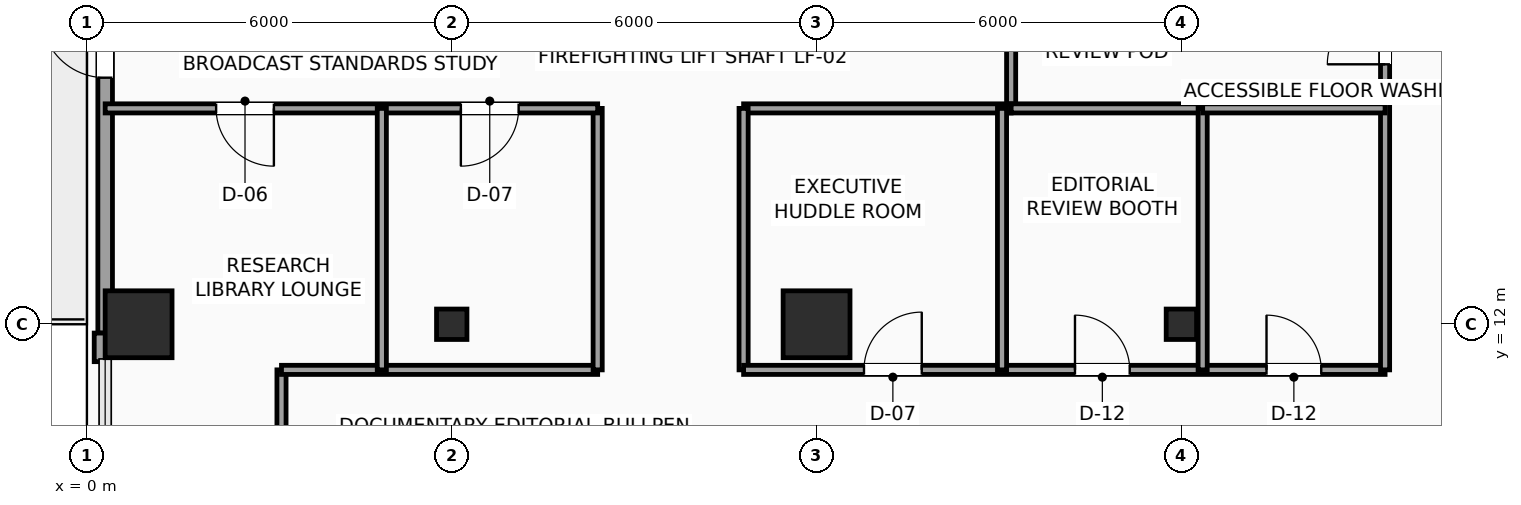
"""IFC4 building model, lengths in metres.
Left out: names, types, materials, properties, quantities, classifications, styles, units other than length and angle.
Written with IfcOpenShell. Run it as: python <this file> out.ifc"""

import sys

from ifc_helpers import new_model, si_unit, direction, frame, frame_2d, origin, origin_2d, place, context, subcontext, project, spatial, rectangle, hollow_rectangle, extrude, element, fill, save


model = new_model("IFC4")
c1 = context("Model", 3, precision=1e-05, world=origin(), true_north=direction((0.0, 1.0)))
c2 = subcontext(c1, "Body", "Model", "MODEL_VIEW")
j1 = project(units=[si_unit("LENGTHUNIT", "METRE"), si_unit("PLANEANGLEUNIT", "RADIAN")], contexts=[c1])
p1 = place(None, origin())
s1 = spatial("IfcSite", under=j1, at=p1, CompositionType="ELEMENT")
p2 = place(p1, origin())
s2 = spatial("IfcBuilding", under=s1, at=p2, CompositionType="ELEMENT")
p3 = place(p2, frame((0.0, 0.0, 160.65)))
s3 = spatial("IfcBuildingStorey", under=s2, at=p3, CompositionType="ELEMENT", Elevation=160.65)
p4 = place(p3, frame((0.85, 12.0, 0.0), z_axis=(0.0, 0.0, 1.0), x_axis=(1.0, 0.0, 0.0)))
e1 = element("IfcColumn", 1, at=p4, inside=s3, PredefinedType="COLUMN", context=c2, shape_type="SweptSolid", body=[
    extrude(rectangle(XDim=1.1, YDim=1.1, at=origin_2d()), origin(), (0.0, 0.0, 1.0), 3.75),
])
p5 = place(p3, frame((6.0, 12.0, 0.0), z_axis=(0.0, 0.0, 1.0), x_axis=(1.0, 0.0, 0.0)))
e2 = element("IfcColumn", 2, at=p5, inside=s3, PredefinedType="COLUMN", context=c2, shape_type="SweptSolid", body=[
    extrude(hollow_rectangle(XDim=0.5, YDim=0.5, WallThickness=0.025, InnerFilletRadius=0.025, OuterFilletRadius=0.04, at=origin_2d()), origin(), (0.0, 0.0, 1.0), 3.75),
])
p6 = place(p3, frame((12.0, 12.0, 0.0), z_axis=(0.0, 0.0, 1.0), x_axis=(1.0, 0.0, 0.0)))
e3 = element("IfcColumn", 3, at=p6, inside=s3, PredefinedType="COLUMN", context=c2, shape_type="SweptSolid", body=[
    extrude(rectangle(XDim=1.1, YDim=1.1, at=origin_2d()), origin(), (0.0, 0.0, 1.0), 3.75),
])
p7 = place(p3, frame((18.0, 12.0, 0.0), z_axis=(0.0, 0.0, 1.0), x_axis=(1.0, 0.0, 0.0)))
e4 = element("IfcColumn", 4, at=p7, inside=s3, PredefinedType="COLUMN", context=c2, shape_type="SweptSolid", body=[
    extrude(hollow_rectangle(XDim=0.5, YDim=0.5, WallThickness=0.025, InnerFilletRadius=0.025, OuterFilletRadius=0.04, at=origin_2d()), origin(), (0.0, 0.0, 1.0), 3.75),
])
p8 = place(p3, frame((0.3, 11.855, 0.0), z_axis=(0.0, 0.0, 1.0), x_axis=(0.0, 1.0, 0.0)))
e5 = element("IfcWall", 5, at=p8, inside=s3, PredefinedType="SOLIDWALL", context=c2, shape_type="SweptSolid", body=[
    extrude(rectangle(XDim=9.29, YDim=0.24, at=frame_2d((4.645, 0.0))), origin(), (0.0, 0.0, 1.0), 3.425),
])
p9 = place(p8, frame((4.2, 0.0, 0.0)))
e6 = element("IfcOpeningElement", 6, at=p9, cuts=e5, PredefinedType="OPENING", context=c2, shape_type="SweptSolid", body=[
    extrude(rectangle(XDim=1.05, YDim=2.2, at=frame_2d((0.525, 1.1))), frame((0.0, 0.13, 0.0), z_axis=(0.0, -1.0, 0.0), x_axis=(1.0, 0.0, 0.0)), (0.0, 0.0, 1.0), 0.26),
])
p10 = place(p8, frame((6.8, 0.0, 0.85)))
e7 = element("IfcOpeningElement", 7, at=p10, cuts=e5, PredefinedType="OPENING", context=c2, shape_type="SweptSolid", body=[
    extrude(rectangle(XDim=1.8, YDim=2.1, at=frame_2d((0.9, 1.05))), frame((0.0, 0.13, 0.0), z_axis=(0.0, -1.0, 0.0), x_axis=(1.0, 0.0, 0.0)), (0.0, 0.0, 1.0), 0.26),
])
p11 = place(p3, frame((0.24, 11.385, 0.0), z_axis=(0.0, 0.0, 1.0), x_axis=(0.0, 1.0, 0.0)))
e8 = element("IfcWall", 8, at=p11, inside=s3, PredefinedType="SOLIDWALL", context=c2, shape_type="SweptSolid", body=[
    extrude(rectangle(XDim=0.47, YDim=0.24, at=frame_2d((0.235, 0.0))), origin(), (0.0, 0.0, 1.0), 3.425),
])
p12 = place(p3, frame((3.2, 9.2, 0.0), z_axis=(0.0, 0.0, 1.0), x_axis=(0.0, 1.0, 0.0)))
e9 = element("IfcWall", 9, at=p12, inside=s3, PredefinedType="PARTITIONING", context=c2, shape_type="SweptSolid", body=[
    extrude(rectangle(XDim=2.05, YDim=0.15, at=frame_2d((1.025, 0.0))), origin(), (0.0, 0.0, 1.0), 3.425),
])
p13 = place(p3, frame((3.2, 11.25, 0.0), z_axis=(0.0, 0.0, 1.0), x_axis=(1.0, 0.0, 0.0)))
e10 = element("IfcWall", 10, at=p13, inside=s3, PredefinedType="PARTITIONING", context=c2, shape_type="SweptSolid", body=[
    extrude(rectangle(XDim=5.2, YDim=0.15, at=frame_2d((2.6, 0.0))), origin(), (0.0, 0.0, 1.0), 3.425),
])
p14 = place(p3, frame((8.4, 11.25, 0.0), z_axis=(0.0, 0.0, 1.0), x_axis=(0.0, 1.0, 0.0)))
e11 = element("IfcWall", 11, at=p14, inside=s3, PredefinedType="PARTITIONING", context=c2, shape_type="SweptSolid", body=[
    extrude(rectangle(XDim=4.3, YDim=0.15, at=frame_2d((2.15, 0.0))), origin(), (0.0, 0.0, 1.0), 3.425),
])
p15 = place(p3, frame((8.4, 15.55, 0.0), z_axis=(0.0, 0.0, 1.0), x_axis=(-1.0, 0.0, 0.0)))
e12 = element("IfcWall", 12, at=p15, inside=s3, PredefinedType="PARTITIONING", context=c2, shape_type="SweptSolid", body=[
    extrude(rectangle(XDim=8.1, YDim=0.15, at=frame_2d((4.05, 0.0))), origin(), (0.0, 0.0, 1.0), 3.425),
])
p16 = place(p15, frame((5.325, 0.0, 0.0)))
e13 = element("IfcOpeningElement", 13, at=p16, cuts=e12, PredefinedType="OPENING", context=c2, shape_type="SweptSolid", body=[
    extrude(rectangle(XDim=0.95, YDim=2.15, at=frame_2d((0.475, 1.075))), frame((0.0, 0.085, 0.0), z_axis=(0.0, -1.0, 0.0), x_axis=(1.0, 0.0, 0.0)), (0.0, 0.0, 1.0), 0.17),
])
p17 = place(p15, frame((1.3, 0.0, 0.0)))
e14 = element("IfcOpeningElement", 14, at=p17, cuts=e12, PredefinedType="OPENING", context=c2, shape_type="SweptSolid", body=[
    extrude(rectangle(XDim=0.95, YDim=2.15, at=frame_2d((0.475, 1.075))), frame((0.0, 0.085, 0.0), z_axis=(0.0, -1.0, 0.0), x_axis=(1.0, 0.0, 0.0)), (0.0, 0.0, 1.0), 0.17),
])
p18 = place(p3, frame((15.2, 17.95, 0.0), z_axis=(0.0, 0.0, 1.0), x_axis=(0.0, -1.0, 0.0)))
e15 = element("IfcWall", 15, at=p18, inside=s3, PredefinedType="PARTITIONING", context=c2, shape_type="SweptSolid", body=[
    extrude(rectangle(XDim=2.4, YDim=0.15, at=frame_2d((1.2, 0.0))), origin(), (0.0, 0.0, 1.0), 3.425),
])
p19 = place(p3, frame((15.2, 15.55, 0.0), z_axis=(0.0, 0.0, 1.0), x_axis=(-1.0, 0.0, 0.0)))
e16 = element("IfcWall", 16, at=p19, inside=s3, PredefinedType="PARTITIONING", context=c2, shape_type="SweptSolid", body=[
    extrude(rectangle(XDim=4.4, YDim=0.15, at=frame_2d((2.2, 0.0))), origin(), (0.0, 0.0, 1.0), 3.425),
])
p20 = place(p3, frame((10.8, 15.55, 0.0), z_axis=(0.0, 0.0, 1.0), x_axis=(0.0, -1.0, 0.0)))
e17 = element("IfcWall", 17, at=p20, inside=s3, PredefinedType="PARTITIONING", context=c2, shape_type="SweptSolid", body=[
    extrude(rectangle(XDim=4.3, YDim=0.15, at=frame_2d((2.15, 0.0))), origin(), (0.0, 0.0, 1.0), 3.425),
])
p21 = place(p3, frame((10.8, 11.25, 0.0), z_axis=(0.0, 0.0, 1.0), x_axis=(1.0, 0.0, 0.0)))
e18 = element("IfcWall", 18, at=p21, inside=s3, PredefinedType="PARTITIONING", context=c2, shape_type="SweptSolid", body=[
    extrude(rectangle(XDim=10.55, YDim=0.15, at=frame_2d((5.275, 0.0))), origin(), (0.0, 0.0, 1.0), 3.425),
])
p22 = place(p21, frame((1.98, 0.0, 0.0)))
e19 = element("IfcOpeningElement", 19, at=p22, cuts=e18, PredefinedType="OPENING", context=c2, shape_type="SweptSolid", body=[
    extrude(rectangle(XDim=0.95, YDim=2.15, at=frame_2d((0.475, 1.075))), frame((0.0, 0.085, 0.0), z_axis=(0.0, -1.0, 0.0), x_axis=(1.0, 0.0, 0.0)), (0.0, 0.0, 1.0), 0.17),
])
p23 = place(p21, frame((5.45, 0.0, 0.0)))
e20 = element("IfcOpeningElement", 20, at=p23, cuts=e18, PredefinedType="OPENING", context=c2, shape_type="SweptSolid", body=[
    extrude(rectangle(XDim=0.9, YDim=2.1, at=frame_2d((0.45, 1.05))), frame((0.0, 0.085, 0.0), z_axis=(0.0, -1.0, 0.0), x_axis=(1.0, 0.0, 0.0)), (0.0, 0.0, 1.0), 0.17),
])
p24 = place(p21, frame((8.6, 0.0, 0.0)))
e21 = element("IfcOpeningElement", 21, at=p24, cuts=e18, PredefinedType="OPENING", context=c2, shape_type="SweptSolid", body=[
    extrude(rectangle(XDim=0.9, YDim=2.1, at=frame_2d((0.45, 1.05))), frame((0.0, 0.085, 0.0), z_axis=(0.0, -1.0, 0.0), x_axis=(1.0, 0.0, 0.0)), (0.0, 0.0, 1.0), 0.17),
])
p25 = place(p3, frame((21.35, 11.25, 0.0), z_axis=(0.0, 0.0, 1.0), x_axis=(0.0, 1.0, 0.0)))
e22 = element("IfcWall", 22, at=p25, inside=s3, PredefinedType="PARTITIONING", context=c2, shape_type="SweptSolid", body=[
    extrude(rectangle(XDim=19.0, YDim=0.15, at=frame_2d((9.5, 0.0))), origin(), (0.0, 0.0, 1.0), 3.425),
])
p26 = place(p25, frame((11.075, 0.0, 0.0)))
e23 = element("IfcOpeningElement", 23, at=p26, cuts=e22, PredefinedType="OPENING", context=c2, shape_type="SweptSolid", body=[
    extrude(rectangle(XDim=0.95, YDim=2.15, at=frame_2d((0.475, 1.075))), frame((0.0, 0.085, 0.0), z_axis=(0.0, -1.0, 0.0), x_axis=(1.0, 0.0, 0.0)), (0.0, 0.0, 1.0), 0.17),
])
p27 = place(p25, frame((5.025, 0.0, 0.0)))
e24 = element("IfcOpeningElement", 24, at=p27, cuts=e22, PredefinedType="OPENING", context=c2, shape_type="SweptSolid", body=[
    extrude(rectangle(XDim=0.95, YDim=2.15, at=frame_2d((0.475, 1.075))), frame((0.0, 0.085, 0.0), z_axis=(0.0, -1.0, 0.0), x_axis=(1.0, 0.0, 0.0)), (0.0, 0.0, 1.0), 0.17),
])
p28 = place(p3, frame((15.05, 11.25, 0.0), z_axis=(0.0, 0.0, 1.0), x_axis=(0.0, 1.0, 0.0)))
e25 = element("IfcWall", 25, at=p28, inside=s3, PredefinedType="PARTITIONING", context=c2, shape_type="SweptSolid", body=[
    extrude(rectangle(XDim=4.3, YDim=0.15, at=frame_2d((2.15, 0.0))), origin(), (0.0, 0.0, 1.0), 3.425),
])
p29 = place(p3, frame((15.2, 15.55, 0.0), z_axis=(0.0, 0.0, 1.0), x_axis=(1.0, 0.0, 0.0)))
e26 = element("IfcWall", 26, at=p29, inside=s3, PredefinedType="PARTITIONING", context=c2, shape_type="SweptSolid", body=[
    extrude(rectangle(XDim=3.15, YDim=0.15, at=frame_2d((1.575, 0.0))), origin(), (0.0, 0.0, 1.0), 3.425),
])
p30 = place(p3, frame((18.35, 11.25, 0.0), z_axis=(0.0, 0.0, 1.0), x_axis=(0.0, 1.0, 0.0)))
e27 = element("IfcWall", 27, at=p30, inside=s3, PredefinedType="PARTITIONING", context=c2, shape_type="SweptSolid", body=[
    extrude(rectangle(XDim=4.3, YDim=0.15, at=frame_2d((2.15, 0.0))), origin(), (0.0, 0.0, 1.0), 3.425),
])
p31 = place(p3, frame((18.35, 15.55, 0.0), z_axis=(0.0, 0.0, 1.0), x_axis=(1.0, 0.0, 0.0)))
e28 = element("IfcWall", 28, at=p31, inside=s3, PredefinedType="PARTITIONING", context=c2, shape_type="SweptSolid", body=[
    extrude(rectangle(XDim=3.0, YDim=0.15, at=frame_2d((1.5, 0.0))), origin(), (0.0, 0.0, 1.0), 3.425),
])
p32 = place(p3, frame((4.85, 11.25, 0.0), z_axis=(0.0, 0.0, 1.0), x_axis=(0.0, 1.0, 0.0)))
e29 = element("IfcWall", 29, at=p32, inside=s3, PredefinedType="PARTITIONING", context=c2, shape_type="SweptSolid", body=[
    extrude(rectangle(XDim=4.3, YDim=0.15, at=frame_2d((2.15, 0.0))), origin(), (0.0, 0.0, 1.0), 3.425),
])
p33 = place(p9, origin())
e30 = element("IfcDoor", 30, at=p33, inside=s3, OperationType="SINGLE_SWING_RIGHT", PredefinedType="DOOR", context=c2, shape_type="SweptSolid", body=[
    extrude(rectangle(XDim=1.05, YDim=2.2, at=frame_2d((0.525, 1.1))), frame((0.0, 0.025, 0.0), z_axis=(0.0, -1.0, 0.0), x_axis=(1.0, 0.0, 0.0)), (0.0, 0.0, 1.0), 0.05),
])
fill(e6, e30)
p34 = place(p16, origin())
e31 = element("IfcDoor", 31, at=p34, inside=s3, OperationType="SINGLE_SWING_LEFT", PredefinedType="DOOR", context=c2, shape_type="SweptSolid", body=[
    extrude(rectangle(XDim=0.95, YDim=2.15, at=frame_2d((0.475, 1.075))), frame((0.0, 0.025, 0.0), z_axis=(0.0, -1.0, 0.0), x_axis=(1.0, 0.0, 0.0)), (0.0, 0.0, 1.0), 0.05),
])
fill(e13, e31)
p35 = place(p17, origin())
e32 = element("IfcDoor", 32, at=p35, inside=s3, OperationType="SINGLE_SWING_RIGHT", PredefinedType="DOOR", context=c2, shape_type="SweptSolid", body=[
    extrude(rectangle(XDim=0.95, YDim=2.15, at=frame_2d((0.475, 1.075))), frame((0.0, 0.025, 0.0), z_axis=(0.0, -1.0, 0.0), x_axis=(1.0, 0.0, 0.0)), (0.0, 0.0, 1.0), 0.05),
])
fill(e14, e32)
p36 = place(p22, origin())
e33 = element("IfcDoor", 33, at=p36, inside=s3, OperationType="SINGLE_SWING_RIGHT", PredefinedType="DOOR", context=c2, shape_type="SweptSolid", body=[
    extrude(rectangle(XDim=0.95, YDim=2.15, at=frame_2d((0.475, 1.075))), frame((0.0, 0.025, 0.0), z_axis=(0.0, -1.0, 0.0), x_axis=(1.0, 0.0, 0.0)), (0.0, 0.0, 1.0), 0.05),
])
fill(e19, e33)
p37 = place(p23, origin())
e34 = element("IfcDoor", 34, at=p37, inside=s3, OperationType="SINGLE_SWING_LEFT", PredefinedType="DOOR", context=c2, shape_type="SweptSolid", body=[
    extrude(rectangle(XDim=0.9, YDim=2.1, at=frame_2d((0.45, 1.05))), frame((0.0, 0.025, 0.0), z_axis=(0.0, -1.0, 0.0), x_axis=(1.0, 0.0, 0.0)), (0.0, 0.0, 1.0), 0.05),
])
fill(e20, e34)
p38 = place(p24, origin())
e35 = element("IfcDoor", 35, at=p38, inside=s3, OperationType="SINGLE_SWING_LEFT", PredefinedType="DOOR", context=c2, shape_type="SweptSolid", body=[
    extrude(rectangle(XDim=0.9, YDim=2.1, at=frame_2d((0.45, 1.05))), frame((0.0, 0.025, 0.0), z_axis=(0.0, -1.0, 0.0), x_axis=(1.0, 0.0, 0.0)), (0.0, 0.0, 1.0), 0.05),
])
fill(e21, e35)
p39 = place(p27, origin())
e36 = element("IfcDoor", 36, at=p39, inside=s3, OperationType="SINGLE_SWING_LEFT", PredefinedType="DOOR", context=c2, shape_type="SweptSolid", body=[
    extrude(rectangle(XDim=0.95, YDim=2.15, at=frame_2d((0.475, 1.075))), frame((0.0, 0.025, 0.0), z_axis=(0.0, -1.0, 0.0), x_axis=(1.0, 0.0, 0.0)), (0.0, 0.0, 1.0), 0.05),
])
fill(e24, e36)
save(model, sys.argv[1])
